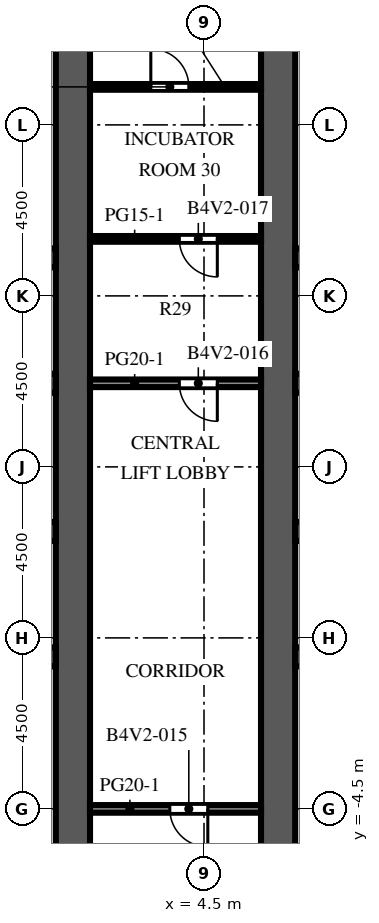
"""IFC4 building model, lengths in metres.
Left out: names, types, materials, properties, quantities, classifications, styles, units other than length and angle.
Written with IfcOpenShell. Run it as: python <this file> out.ifc"""

import sys

from ifc_helpers import new_model, si_unit, direction, frame, frame_2d, origin, place, context, subcontext, project, spatial, rectangle, extrude, element, fill, save


model = new_model("IFC4")
c1 = context("Model", 3, precision=1e-05, world=origin(), true_north=direction((0.0, 1.0)))
c2 = subcontext(c1, "Body", "Model", "MODEL_VIEW")
j1 = project(units=[si_unit("LENGTHUNIT", "METRE"), si_unit("PLANEANGLEUNIT", "RADIAN")], contexts=[c1])
p1 = place(None, origin())
s1 = spatial("IfcSite", under=j1, at=p1, CompositionType="ELEMENT")
p2 = place(p1, origin())
s2 = spatial("IfcBuilding", under=s1, at=p2, CompositionType="ELEMENT")
p3 = place(p2, frame((0.0, 0.0, 137.2)))
s3 = spatial("IfcBuildingStorey", under=s2, at=p3, CompositionType="ELEMENT", Elevation=137.2)
p4 = place(p3, frame((1.05, -9.0, 0.0), z_axis=(0.0, 0.0, 1.0), x_axis=(0.0, 1.0, 0.0)))
e1 = element("IfcWall", 1, at=p4, inside=s3, PredefinedType="SHEAR", context=c2, shape_type="SweptSolid", body=[
    extrude(rectangle(XDim=27.5, YDim=0.9, at=frame_2d((13.75, 0.0))), origin(), (0.0, 0.0, 1.0), 4.1),
])
p5 = place(p4, frame((12.55, 0.0, 0.0)))
e2 = element("IfcOpeningElement", 2, at=p5, cuts=e1, PredefinedType="OPENING", context=c2, shape_type="SweptSolid", body=[
    extrude(rectangle(XDim=2.4, YDim=2.4, at=frame_2d((1.2, 1.2))), frame((0.0, 0.46, 0.0), z_axis=(0.0, -1.0, 0.0), x_axis=(1.0, 0.0, 0.0)), (0.0, 0.0, 1.0), 0.92),
])
p6 = place(p4, frame((5.51, 0.0, 0.0)))
e3 = element("IfcOpeningElement", 3, at=p6, cuts=e1, PredefinedType="OPENING", context=c2, shape_type="SweptSolid", body=[
    extrude(rectangle(XDim=0.923, YDim=2.1, at=frame_2d((0.461, 1.05))), frame((0.0, 0.46, 0.0), z_axis=(0.0, -1.0, 0.0), x_axis=(1.0, 0.0, 0.0)), (0.0, 0.0, 1.0), 0.92),
])
p7 = place(p4, frame((23.427, 0.0, 0.0)))
e4 = element("IfcOpeningElement", 4, at=p7, cuts=e1, PredefinedType="OPENING", context=c2, shape_type="SweptSolid", body=[
    extrude(rectangle(XDim=1.2, YDim=2.1, at=frame_2d((0.6, 1.05))), frame((0.0, 0.46, 0.0), z_axis=(0.0, -1.0, 0.0), x_axis=(1.0, 0.0, 0.0)), (0.0, 0.0, 1.0), 0.92),
])
p8 = place(p3, frame((-9.6, -0.5, 0.0), z_axis=(0.0, 0.0, 1.0), x_axis=(1.0, 0.0, 0.0)))
e5 = element("IfcWall", 5, at=p8, inside=s3, PredefinedType="SHEAR", context=c2, shape_type="SweptSolid", body=[
    extrude(rectangle(XDim=10.2, YDim=0.5, at=frame_2d((5.1, 0.0))), origin(), (0.0, 0.0, 1.0), 4.1),
])
p9 = place(p3, frame((-9.6, 2.8, 0.0), z_axis=(0.0, 0.0, 1.0), x_axis=(1.0, 0.0, 0.0)))
e6 = element("IfcWall", 6, at=p9, inside=s3, PredefinedType="SHEAR", context=c2, shape_type="SweptSolid", body=[
    extrude(rectangle(XDim=10.2, YDim=0.5, at=frame_2d((5.1, 0.0))), origin(), (0.0, 0.0, 1.0), 4.1),
])
p10 = place(p9, frame((0.562, 0.0, 0.0)))
e7 = element("IfcOpeningElement", 7, at=p10, cuts=e6, PredefinedType="OPENING", context=c2, shape_type="SweptSolid", body=[
    extrude(rectangle(XDim=1.1, YDim=2.1, at=frame_2d((0.55, 1.05))), frame((0.0, 0.26, 0.0), z_axis=(0.0, -1.0, 0.0), x_axis=(1.0, 0.0, 0.0)), (0.0, 0.0, 1.0), 0.52),
])
p11 = place(p9, frame((3.238, 0.0, 0.0)))
e8 = element("IfcOpeningElement", 8, at=p11, cuts=e6, PredefinedType="OPENING", context=c2, shape_type="SweptSolid", body=[
    extrude(rectangle(XDim=1.1, YDim=2.1, at=frame_2d((0.55, 1.05))), frame((0.0, 0.26, 0.0), z_axis=(0.0, -1.0, 0.0), x_axis=(1.0, 0.0, 0.0)), (0.0, 0.0, 1.0), 0.52),
])
p12 = place(p9, frame((8.538, 0.0, 0.0)))
e9 = element("IfcOpeningElement", 9, at=p12, cuts=e6, PredefinedType="OPENING", context=c2, shape_type="SweptSolid", body=[
    extrude(rectangle(XDim=1.1, YDim=2.1, at=frame_2d((0.55, 1.05))), frame((0.0, 0.26, 0.0), z_axis=(0.0, -1.0, 0.0), x_axis=(1.0, 0.0, 0.0)), (0.0, 0.0, 1.0), 0.52),
])
p13 = place(p3, frame((-9.6, 6.7, 0.0), z_axis=(0.0, 0.0, 1.0), x_axis=(1.0, 0.0, 0.0)))
e10 = element("IfcWall", 10, at=p13, inside=s3, PredefinedType="SHEAR", context=c2, shape_type="SweptSolid", body=[
    extrude(rectangle(XDim=10.2, YDim=0.5, at=frame_2d((5.1, 0.0))), origin(), (0.0, 0.0, 1.0), 4.1),
])
p14 = place(p13, frame((0.562, 0.0, 0.0)))
e11 = element("IfcOpeningElement", 11, at=p14, cuts=e10, PredefinedType="OPENING", context=c2, shape_type="SweptSolid", body=[
    extrude(rectangle(XDim=1.1, YDim=2.1, at=frame_2d((0.55, 1.05))), frame((0.0, 0.26, 0.0), z_axis=(0.0, -1.0, 0.0), x_axis=(1.0, 0.0, 0.0)), (0.0, 0.0, 1.0), 0.52),
])
p15 = place(p13, frame((3.288, 0.0, 0.0)))
e12 = element("IfcOpeningElement", 12, at=p15, cuts=e10, PredefinedType="OPENING", context=c2, shape_type="SweptSolid", body=[
    extrude(rectangle(XDim=1.0, YDim=2.1, at=frame_2d((0.5, 1.05))), frame((0.0, 0.26, 0.0), z_axis=(0.0, -1.0, 0.0), x_axis=(1.0, 0.0, 0.0)), (0.0, 0.0, 1.0), 0.52),
])
p16 = place(p13, frame((5.913, 0.0, 0.0)))
e13 = element("IfcOpeningElement", 13, at=p16, cuts=e10, PredefinedType="OPENING", context=c2, shape_type="SweptSolid", body=[
    extrude(rectangle(XDim=1.0, YDim=2.1, at=frame_2d((0.5, 1.05))), frame((0.0, 0.26, 0.0), z_axis=(0.0, -1.0, 0.0), x_axis=(1.0, 0.0, 0.0)), (0.0, 0.0, 1.0), 0.52),
])
p17 = place(p13, frame((8.587, 0.0, 0.0)))
e14 = element("IfcOpeningElement", 14, at=p17, cuts=e10, PredefinedType="OPENING", context=c2, shape_type="SweptSolid", body=[
    extrude(rectangle(XDim=1.0, YDim=2.1, at=frame_2d((0.5, 1.05))), frame((0.0, 0.26, 0.0), z_axis=(0.0, -1.0, 0.0), x_axis=(1.0, 0.0, 0.0)), (0.0, 0.0, 1.0), 0.52),
])
p18 = place(p3, frame((-9.6, 10.0, 0.0), z_axis=(0.0, 0.0, 1.0), x_axis=(1.0, 0.0, 0.0)))
e15 = element("IfcWall", 15, at=p18, inside=s3, PredefinedType="SHEAR", context=c2, shape_type="SweptSolid", body=[
    extrude(rectangle(XDim=10.2, YDim=0.5, at=frame_2d((5.1, 0.0))), origin(), (0.0, 0.0, 1.0), 4.1),
])
p19 = place(p3, frame((6.45, -9.0, 0.0), z_axis=(0.0, 0.0, 1.0), x_axis=(0.0, 1.0, 0.0)))
e16 = element("IfcWall", 16, at=p19, inside=s3, PredefinedType="SHEAR", context=c2, shape_type="SweptSolid", body=[
    extrude(rectangle(XDim=27.5, YDim=0.9, at=frame_2d((13.75, 0.0))), origin(), (0.0, 0.0, 1.0), 4.1),
])
p20 = place(p19, frame((12.55, 0.0, 0.0)))
e17 = element("IfcOpeningElement", 17, at=p20, cuts=e16, PredefinedType="OPENING", context=c2, shape_type="SweptSolid", body=[
    extrude(rectangle(XDim=2.4, YDim=2.4, at=frame_2d((1.2, 1.2))), frame((0.0, 0.46, 0.0), z_axis=(0.0, -1.0, 0.0), x_axis=(1.0, 0.0, 0.0)), (0.0, 0.0, 1.0), 0.92),
])
p21 = place(p19, frame((5.51, 0.0, 0.0)))
e18 = element("IfcOpeningElement", 18, at=p21, cuts=e16, PredefinedType="OPENING", context=c2, shape_type="SweptSolid", body=[
    extrude(rectangle(XDim=0.923, YDim=2.1, at=frame_2d((0.461, 1.05))), frame((0.0, 0.46, 0.0), z_axis=(0.0, -1.0, 0.0), x_axis=(1.0, 0.0, 0.0)), (0.0, 0.0, 1.0), 0.92),
])
p22 = place(p19, frame((23.427, 0.0, 0.0)))
e19 = element("IfcOpeningElement", 19, at=p22, cuts=e16, PredefinedType="OPENING", context=c2, shape_type="SweptSolid", body=[
    extrude(rectangle(XDim=1.2, YDim=2.1, at=frame_2d((0.6, 1.05))), frame((0.0, 0.46, 0.0), z_axis=(0.0, -1.0, 0.0), x_axis=(1.0, 0.0, 0.0)), (0.0, 0.0, 1.0), 0.92),
])
p23 = place(p3, frame((6.9, -0.5, 0.0), z_axis=(0.0, 0.0, 1.0), x_axis=(1.0, 0.0, 0.0)))
e20 = element("IfcWall", 20, at=p23, inside=s3, PredefinedType="SHEAR", context=c2, shape_type="SweptSolid", body=[
    extrude(rectangle(XDim=10.2, YDim=0.5, at=frame_2d((5.1, 0.0))), origin(), (0.0, 0.0, 1.0), 4.1),
])
p24 = place(p3, frame((6.9, 2.8, 0.0), z_axis=(0.0, 0.0, 1.0), x_axis=(1.0, 0.0, 0.0)))
e21 = element("IfcWall", 21, at=p24, inside=s3, PredefinedType="SHEAR", context=c2, shape_type="SweptSolid", body=[
    extrude(rectangle(XDim=10.2, YDim=0.5, at=frame_2d((5.1, 0.0))), origin(), (0.0, 0.0, 1.0), 4.1),
])
p25 = place(p24, frame((0.562, 0.0, 0.0)))
e22 = element("IfcOpeningElement", 22, at=p25, cuts=e21, PredefinedType="OPENING", context=c2, shape_type="SweptSolid", body=[
    extrude(rectangle(XDim=1.1, YDim=2.1, at=frame_2d((0.55, 1.05))), frame((0.0, 0.26, 0.0), z_axis=(0.0, -1.0, 0.0), x_axis=(1.0, 0.0, 0.0)), (0.0, 0.0, 1.0), 0.52),
])
p26 = place(p24, frame((3.238, 0.0, 0.0)))
e23 = element("IfcOpeningElement", 23, at=p26, cuts=e21, PredefinedType="OPENING", context=c2, shape_type="SweptSolid", body=[
    extrude(rectangle(XDim=1.1, YDim=2.1, at=frame_2d((0.55, 1.05))), frame((0.0, 0.26, 0.0), z_axis=(0.0, -1.0, 0.0), x_axis=(1.0, 0.0, 0.0)), (0.0, 0.0, 1.0), 0.52),
])
p27 = place(p24, frame((8.538, 0.0, 0.0)))
e24 = element("IfcOpeningElement", 24, at=p27, cuts=e21, PredefinedType="OPENING", context=c2, shape_type="SweptSolid", body=[
    extrude(rectangle(XDim=1.1, YDim=2.1, at=frame_2d((0.55, 1.05))), frame((0.0, 0.26, 0.0), z_axis=(0.0, -1.0, 0.0), x_axis=(1.0, 0.0, 0.0)), (0.0, 0.0, 1.0), 0.52),
])
p28 = place(p3, frame((6.9, 6.7, 0.0), z_axis=(0.0, 0.0, 1.0), x_axis=(1.0, 0.0, 0.0)))
e25 = element("IfcWall", 25, at=p28, inside=s3, PredefinedType="SHEAR", context=c2, shape_type="SweptSolid", body=[
    extrude(rectangle(XDim=10.2, YDim=0.5, at=frame_2d((5.1, 0.0))), origin(), (0.0, 0.0, 1.0), 4.1),
])
p29 = place(p28, frame((0.562, 0.0, 0.0)))
e26 = element("IfcOpeningElement", 26, at=p29, cuts=e25, PredefinedType="OPENING", context=c2, shape_type="SweptSolid", body=[
    extrude(rectangle(XDim=1.1, YDim=2.1, at=frame_2d((0.55, 1.05))), frame((0.0, 0.26, 0.0), z_axis=(0.0, -1.0, 0.0), x_axis=(1.0, 0.0, 0.0)), (0.0, 0.0, 1.0), 0.52),
])
p30 = place(p28, frame((3.288, 0.0, 0.0)))
e27 = element("IfcOpeningElement", 27, at=p30, cuts=e25, PredefinedType="OPENING", context=c2, shape_type="SweptSolid", body=[
    extrude(rectangle(XDim=1.0, YDim=2.1, at=frame_2d((0.5, 1.05))), frame((0.0, 0.26, 0.0), z_axis=(0.0, -1.0, 0.0), x_axis=(1.0, 0.0, 0.0)), (0.0, 0.0, 1.0), 0.52),
])
p31 = place(p28, frame((5.913, 0.0, 0.0)))
e28 = element("IfcOpeningElement", 28, at=p31, cuts=e25, PredefinedType="OPENING", context=c2, shape_type="SweptSolid", body=[
    extrude(rectangle(XDim=1.0, YDim=2.1, at=frame_2d((0.5, 1.05))), frame((0.0, 0.26, 0.0), z_axis=(0.0, -1.0, 0.0), x_axis=(1.0, 0.0, 0.0)), (0.0, 0.0, 1.0), 0.52),
])
p32 = place(p28, frame((8.587, 0.0, 0.0)))
e29 = element("IfcOpeningElement", 29, at=p32, cuts=e25, PredefinedType="OPENING", context=c2, shape_type="SweptSolid", body=[
    extrude(rectangle(XDim=1.0, YDim=2.1, at=frame_2d((0.5, 1.05))), frame((0.0, 0.26, 0.0), z_axis=(0.0, -1.0, 0.0), x_axis=(1.0, 0.0, 0.0)), (0.0, 0.0, 1.0), 0.52),
])
p33 = place(p3, frame((6.9, 10.0, 0.0), z_axis=(0.0, 0.0, 1.0), x_axis=(1.0, 0.0, 0.0)))
e30 = element("IfcWall", 30, at=p33, inside=s3, PredefinedType="SHEAR", context=c2, shape_type="SweptSolid", body=[
    extrude(rectangle(XDim=10.2, YDim=0.5, at=frame_2d((5.1, 0.0))), origin(), (0.0, 0.0, 1.0), 4.1),
])
p34 = place(p3, frame((-1.825, -3.69, 0.0), z_axis=(0.0, 0.0, 1.0), x_axis=(1.0, 0.0, 0.0)))
e31 = element("IfcWall", 31, at=p34, inside=s3, PredefinedType="PARTITIONING", context=c2, shape_type="SweptSolid", body=[
    extrude(rectangle(XDim=2.425, YDim=0.1, at=frame_2d((1.212, 0.0))), origin(), (0.0, 0.0, 1.0), 3.65),
])
p35 = place(p34, frame((0.712, 0.0, 0.0)))
e32 = element("IfcOpeningElement", 32, at=p35, cuts=e31, PredefinedType="OPENING", context=c2, shape_type="SweptSolid", body=[
    extrude(rectangle(XDim=1.0, YDim=2.1, at=frame_2d((0.5, 1.05))), frame((0.0, 0.06, 0.0), z_axis=(0.0, -1.0, 0.0), x_axis=(1.0, 0.0, 0.0)), (0.0, 0.0, 1.0), 0.12),
])
p36 = place(p3, frame((-1.825, -2.367, 0.0), z_axis=(0.0, 0.0, 1.0), x_axis=(1.0, 0.0, 0.0)))
e33 = element("IfcWall", 33, at=p36, inside=s3, PredefinedType="PARTITIONING", context=c2, shape_type="SweptSolid", body=[
    extrude(rectangle(XDim=2.425, YDim=0.1, at=frame_2d((1.212, 0.0))), origin(), (0.0, 0.0, 1.0), 3.65),
])
p37 = place(p36, frame((0.712, 0.0, 0.0)))
e34 = element("IfcOpeningElement", 34, at=p37, cuts=e33, PredefinedType="OPENING", context=c2, shape_type="SweptSolid", body=[
    extrude(rectangle(XDim=1.0, YDim=2.1, at=frame_2d((0.5, 1.05))), frame((0.0, 0.06, 0.0), z_axis=(0.0, -1.0, 0.0), x_axis=(1.0, 0.0, 0.0)), (0.0, 0.0, 1.0), 0.12),
])
p38 = place(p3, frame((-0.7, 12.455, 0.0), z_axis=(0.0, 0.0, 1.0), x_axis=(1.0, 0.0, 0.0)))
e35 = element("IfcWall", 35, at=p38, inside=s3, PredefinedType="PARTITIONING", context=c2, shape_type="SweptSolid", body=[
    extrude(rectangle(XDim=1.3, YDim=0.1, at=frame_2d((0.65, 0.0))), origin(), (0.0, 0.0, 1.0), 3.65),
])
p39 = place(p38, frame((0.2, 0.0, 0.0)))
e36 = element("IfcOpeningElement", 36, at=p39, cuts=e35, PredefinedType="OPENING", context=c2, shape_type="SweptSolid", body=[
    extrude(rectangle(XDim=0.9, YDim=2.1, at=frame_2d((0.45, 1.05))), frame((0.0, 0.06, 0.0), z_axis=(0.0, -1.0, 0.0), x_axis=(1.0, 0.0, 0.0)), (0.0, 0.0, 1.0), 0.12),
])
p40 = place(p3, frame((6.9, -3.69, 0.0), z_axis=(0.0, 0.0, 1.0), x_axis=(1.0, 0.0, 0.0)))
e37 = element("IfcWall", 37, at=p40, inside=s3, PredefinedType="PARTITIONING", context=c2, shape_type="SweptSolid", body=[
    extrude(rectangle(XDim=2.425, YDim=0.1, at=frame_2d((1.212, 0.0))), origin(), (0.0, 0.0, 1.0), 3.65),
])
p41 = place(p40, frame((0.712, 0.0, 0.0)))
e38 = element("IfcOpeningElement", 38, at=p41, cuts=e37, PredefinedType="OPENING", context=c2, shape_type="SweptSolid", body=[
    extrude(rectangle(XDim=1.0, YDim=2.1, at=frame_2d((0.5, 1.05))), frame((0.0, 0.06, 0.0), z_axis=(0.0, -1.0, 0.0), x_axis=(1.0, 0.0, 0.0)), (0.0, 0.0, 1.0), 0.12),
])
p42 = place(p3, frame((6.9, -2.367, 0.0), z_axis=(0.0, 0.0, 1.0), x_axis=(1.0, 0.0, 0.0)))
e39 = element("IfcWall", 39, at=p42, inside=s3, PredefinedType="PARTITIONING", context=c2, shape_type="SweptSolid", body=[
    extrude(rectangle(XDim=2.425, YDim=0.1, at=frame_2d((1.212, 0.0))), origin(), (0.0, 0.0, 1.0), 3.65),
])
p43 = place(p42, frame((0.712, 0.0, 0.0)))
e40 = element("IfcOpeningElement", 40, at=p43, cuts=e39, PredefinedType="OPENING", context=c2, shape_type="SweptSolid", body=[
    extrude(rectangle(XDim=1.0, YDim=2.1, at=frame_2d((0.5, 1.05))), frame((0.0, 0.06, 0.0), z_axis=(0.0, -1.0, 0.0), x_axis=(1.0, 0.0, 0.0)), (0.0, 0.0, 1.0), 0.12),
])
p44 = place(p3, frame((6.9, 12.455, 0.0), z_axis=(0.0, 0.0, 1.0), x_axis=(1.0, 0.0, 0.0)))
e41 = element("IfcWall", 41, at=p44, inside=s3, PredefinedType="PARTITIONING", context=c2, shape_type="SweptSolid", body=[
    extrude(rectangle(XDim=1.3, YDim=0.1, at=frame_2d((0.65, 0.0))), origin(), (0.0, 0.0, 1.0), 3.65),
])
p45 = place(p44, frame((0.2, 0.0, 0.0)))
e42 = element("IfcOpeningElement", 42, at=p45, cuts=e41, PredefinedType="OPENING", context=c2, shape_type="SweptSolid", body=[
    extrude(rectangle(XDim=0.9, YDim=2.1, at=frame_2d((0.45, 1.05))), frame((0.0, 0.06, 0.0), z_axis=(0.0, -1.0, 0.0), x_axis=(1.0, 0.0, 0.0)), (0.0, 0.0, 1.0), 0.12),
])
p46 = place(p3, frame((6.0, -4.5, 0.0), z_axis=(0.0, 0.0, 1.0), x_axis=(-1.0, 0.0, 0.0)))
e43 = element("IfcWall", 43, at=p46, inside=s3, PredefinedType="PARTITIONING", context=c2, shape_type="SweptSolid", body=[
    extrude(rectangle(XDim=4.5, YDim=0.2, at=frame_2d((2.25, 0.0))), origin(), (0.0, 0.0, 1.0), 3.65),
])
p47 = place(p46, frame((1.4, 0.0, 0.0)))
e44 = element("IfcOpeningElement", 44, at=p47, cuts=e43, PredefinedType="OPENING", context=c2, shape_type="SweptSolid", body=[
    extrude(rectangle(XDim=1.0, YDim=2.1, at=frame_2d((0.5, 1.05))), frame((0.0, 0.11, 0.0), z_axis=(0.0, -1.0, 0.0), x_axis=(1.0, 0.0, 0.0)), (0.0, 0.0, 1.0), 0.22),
])
p48 = place(p3, frame((1.5, 6.7, 0.0), z_axis=(0.0, 0.0, 1.0), x_axis=(1.0, 0.0, 0.0)))
e45 = element("IfcWall", 45, at=p48, inside=s3, PredefinedType="PARTITIONING", context=c2, shape_type="SweptSolid", body=[
    extrude(rectangle(XDim=4.5, YDim=0.2, at=frame_2d((2.25, 0.0))), origin(), (0.0, 0.0, 1.0), 3.65),
])
p49 = place(p48, frame((2.35, 0.0, 0.0)))
e46 = element("IfcOpeningElement", 46, at=p49, cuts=e45, PredefinedType="OPENING", context=c2, shape_type="SweptSolid", body=[
    extrude(rectangle(XDim=1.0, YDim=2.1, at=frame_2d((0.5, 1.05))), frame((0.0, 0.11, 0.0), z_axis=(0.0, -1.0, 0.0), x_axis=(1.0, 0.0, 0.0)), (0.0, 0.0, 1.0), 0.22),
])
p50 = place(p3, frame((1.5, 10.5, 0.0), z_axis=(0.0, 0.0, 1.0), x_axis=(1.0, 0.0, 0.0)))
e47 = element("IfcWall", 47, at=p50, inside=s3, PredefinedType="PARTITIONING", context=c2, shape_type="SweptSolid", body=[
    extrude(rectangle(XDim=4.5, YDim=0.15, at=frame_2d((2.25, 0.0))), origin(), (0.0, 0.0, 1.0), 3.65),
])
p51 = place(p50, frame((2.35, 0.0, 0.0)))
e48 = element("IfcOpeningElement", 48, at=p51, cuts=e47, PredefinedType="OPENING", context=c2, shape_type="SweptSolid", body=[
    extrude(rectangle(XDim=1.0, YDim=2.1, at=frame_2d((0.5, 1.05))), frame((0.0, 0.085, 0.0), z_axis=(0.0, -1.0, 0.0), x_axis=(1.0, 0.0, 0.0)), (0.0, 0.0, 1.0), 0.17),
])
p52 = place(p3, frame((1.5, 14.5, 0.0), z_axis=(0.0, 0.0, 1.0), x_axis=(1.0, 0.0, 0.0)))
e49 = element("IfcWall", 49, at=p52, inside=s3, PredefinedType="PARTITIONING", context=c2, shape_type="SweptSolid", body=[
    extrude(rectangle(XDim=4.5, YDim=0.15, at=frame_2d((2.25, 0.0))), origin(), (0.0, 0.0, 1.0), 3.65),
])
p53 = place(p52, frame((1.6, 0.0, 0.0)))
e50 = element("IfcOpeningElement", 50, at=p53, cuts=e49, PredefinedType="OPENING", context=c2, shape_type="SweptSolid", body=[
    extrude(rectangle(XDim=1.0, YDim=2.1, at=frame_2d((0.5, 1.05))), frame((0.0, 0.085, 0.0), z_axis=(0.0, -1.0, 0.0), x_axis=(1.0, 0.0, 0.0)), (0.0, 0.0, 1.0), 0.17),
])
p54 = place(p5, origin())
e51 = element("IfcDoor", 51, at=p54, inside=s3, OperationType="DOUBLE_DOOR_DOUBLE_SWING", PredefinedType="DOOR", context=c2, shape_type="SweptSolid", body=[
    extrude(rectangle(XDim=2.4, YDim=2.4, at=frame_2d((1.2, 1.2))), frame((0.0, 0.025, 0.0), z_axis=(0.0, -1.0, 0.0), x_axis=(1.0, 0.0, 0.0)), (0.0, 0.0, 1.0), 0.05),
])
fill(e2, e51)
p55 = place(p20, origin())
e52 = element("IfcDoor", 52, at=p55, inside=s3, OperationType="DOUBLE_DOOR_DOUBLE_SWING", PredefinedType="DOOR", context=c2, shape_type="SweptSolid", body=[
    extrude(rectangle(XDim=2.4, YDim=2.4, at=frame_2d((1.2, 1.2))), frame((0.0, 0.025, 0.0), z_axis=(0.0, -1.0, 0.0), x_axis=(1.0, 0.0, 0.0)), (0.0, 0.0, 1.0), 0.05),
])
fill(e17, e52)
p56 = place(p6, origin())
e53 = element("IfcDoor", 53, at=p56, inside=s3, OperationType="SINGLE_SWING_LEFT", PredefinedType="DOOR", context=c2, shape_type="SweptSolid", body=[
    extrude(rectangle(XDim=0.923, YDim=2.1, at=frame_2d((0.461, 1.05))), frame((0.0, 0.425, 0.0), z_axis=(0.0, -1.0, 0.0), x_axis=(1.0, 0.0, 0.0)), (0.0, 0.0, 1.0), 0.05),
])
fill(e3, e53)
p57 = place(p7, origin())
e54 = element("IfcDoor", 54, at=p57, inside=s3, OperationType="SINGLE_SWING_RIGHT", PredefinedType="DOOR", context=c2, shape_type="SweptSolid", body=[
    extrude(rectangle(XDim=1.2, YDim=2.1, at=frame_2d((0.6, 1.05))), frame((0.0, 0.425, 0.0), z_axis=(0.0, -1.0, 0.0), x_axis=(1.0, 0.0, 0.0)), (0.0, 0.0, 1.0), 0.05),
])
fill(e4, e54)
p58 = place(p21, origin())
e55 = element("IfcDoor", 55, at=p58, inside=s3, OperationType="SINGLE_SWING_RIGHT", PredefinedType="DOOR", context=c2, shape_type="SweptSolid", body=[
    extrude(rectangle(XDim=0.923, YDim=2.1, at=frame_2d((0.461, 1.05))), frame((0.0, -0.375, 0.0), z_axis=(0.0, -1.0, 0.0), x_axis=(1.0, 0.0, 0.0)), (0.0, 0.0, 1.0), 0.05),
])
fill(e18, e55)
p59 = place(p22, origin())
e56 = element("IfcDoor", 56, at=p59, inside=s3, OperationType="SINGLE_SWING_LEFT", PredefinedType="DOOR", context=c2, shape_type="SweptSolid", body=[
    extrude(rectangle(XDim=1.2, YDim=2.1, at=frame_2d((0.6, 1.05))), frame((0.0, -0.375, 0.0), z_axis=(0.0, -1.0, 0.0), x_axis=(1.0, 0.0, 0.0)), (0.0, 0.0, 1.0), 0.05),
])
fill(e19, e56)
p60 = place(p47, origin())
e57 = element("IfcDoor", 57, at=p60, inside=s3, OperationType="SINGLE_SWING_LEFT", PredefinedType="DOOR", context=c2, shape_type="SweptSolid", body=[
    extrude(rectangle(XDim=1.0, YDim=2.1, at=frame_2d((0.5, 1.05))), frame((0.0, 0.025, 0.0), z_axis=(0.0, -1.0, 0.0), x_axis=(1.0, 0.0, 0.0)), (0.0, 0.0, 1.0), 0.05),
])
fill(e44, e57)
p61 = place(p49, origin())
e58 = element("IfcDoor", 58, at=p61, inside=s3, OperationType="SINGLE_SWING_RIGHT", PredefinedType="DOOR", context=c2, shape_type="SweptSolid", body=[
    extrude(rectangle(XDim=1.0, YDim=2.1, at=frame_2d((0.5, 1.05))), frame((0.0, 0.025, 0.0), z_axis=(0.0, -1.0, 0.0), x_axis=(1.0, 0.0, 0.0)), (0.0, 0.0, 1.0), 0.05),
])
fill(e46, e58)
p62 = place(p51, origin())
e59 = element("IfcDoor", 59, at=p62, inside=s3, OperationType="SINGLE_SWING_RIGHT", PredefinedType="DOOR", context=c2, shape_type="SweptSolid", body=[
    extrude(rectangle(XDim=1.0, YDim=2.1, at=frame_2d((0.5, 1.05))), frame((0.0, 0.025, 0.0), z_axis=(0.0, -1.0, 0.0), x_axis=(1.0, 0.0, 0.0)), (0.0, 0.0, 1.0), 0.05),
])
fill(e48, e59)
p63 = place(p53, origin())
e60 = element("IfcDoor", 60, at=p63, inside=s3, OperationType="SINGLE_SWING_LEFT", PredefinedType="DOOR", context=c2, shape_type="SweptSolid", body=[
    extrude(rectangle(XDim=1.0, YDim=2.1, at=frame_2d((0.5, 1.05))), frame((0.0, 0.025, 0.0), z_axis=(0.0, -1.0, 0.0), x_axis=(1.0, 0.0, 0.0)), (0.0, 0.0, 1.0), 0.05),
])
fill(e50, e60)
save(model, sys.argv[1])
